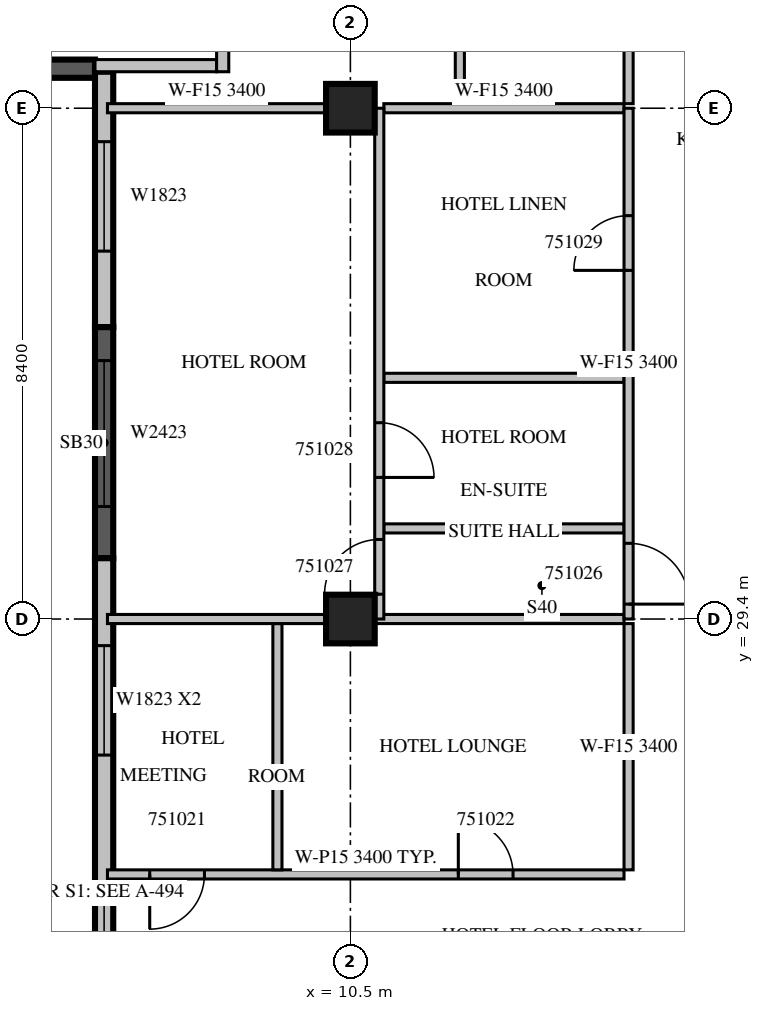
"""IFC4 building model, lengths in metres.
Left out: names, types, materials, properties, quantities, classifications, styles, units other than length and angle.
Written with IfcOpenShell. Run it as: python <this file> out.ifc"""

import sys

from ifc_helpers import new_model, si_unit, direction, frame, frame_2d, origin, origin_2d, place, context, subcontext, project, spatial, rectangle, extrude, source, transform, mapped, element, fill, save


model = new_model("IFC4")
c1 = context("Model", 3, precision=1e-05, world=origin(), true_north=direction((0.0, 1.0)))
c2 = subcontext(c1, "Body", "Model", "MODEL_VIEW")
j1 = project(units=[si_unit("LENGTHUNIT", "METRE"), si_unit("PLANEANGLEUNIT", "RADIAN")], contexts=[c1])
p1 = place(None, origin())
s1 = spatial("IfcSite", under=j1, at=p1, CompositionType="ELEMENT")
p2 = place(p1, origin())
s2 = spatial("IfcBuilding", under=s1, at=p2, CompositionType="ELEMENT")
p3 = place(p2, frame((0.0, 0.0, 227.2)))
s3 = spatial("IfcBuildingStorey", under=s2, at=p3, CompositionType="ELEMENT", Elevation=227.2)
m1 = source(origin(), c2, "Body", "SweptSolid", [
    extrude(rectangle(XDim=0.8, YDim=0.8, at=origin_2d()), origin(), (0.0, 0.0, 1.0), 3.8),
])
for number, where, z_axis, x_axis in (
    (1, (10.5, 29.4, 0.0), (0.0, 0.0, 1.0), (1.0, 0.0, 0.0)),
    (2, (10.5, 37.8, 0.0), (0.0, 0.0, 1.0), (1.0, 0.0, 0.0)),
):
    element("IfcColumn", number, at=place(p3, frame(where, z_axis=z_axis, x_axis=x_axis)), inside=s3, PredefinedType="COLUMN", context=c2, shape_type="MappedRepresentation", body=[
        mapped(m1, transform((0.0, 0.0, 0.0), scale=1.0)),
    ])
m2 = source(origin(), c2, "Body", "SweptSolid", [
    extrude(rectangle(XDim=6.1, YDim=0.3, at=frame_2d((3.05, 0.0))), origin(), (0.0, 0.0, 1.0), 3.4),
])
p4 = place(p3, frame((0.2, 38.45, 0.0), z_axis=(0.0, 0.0, 1.0), x_axis=(1.0, 0.0, 0.0)))
e3 = element("IfcWall", 3, at=p4, inside=s3, PredefinedType="SOLIDWALL", context=c2, shape_type="MappedRepresentation", body=[
    mapped(m2, transform((0.0, 0.0, 0.0), scale=1.0)),
])
m3 = source(origin(), c2, "Body", "SweptSolid", [
    extrude(rectangle(XDim=4.2, YDim=0.3, at=frame_2d((2.1, 0.0))), origin(), (0.0, 0.0, 1.0), 3.4),
])
p5 = place(p3, frame((6.45, 38.4, 0.0), z_axis=(0.0, 0.0, 1.0), x_axis=(0.0, -1.0, 0.0)))
e4 = element("IfcWall", 4, at=p5, inside=s3, PredefinedType="STANDARD", context=c2, shape_type="MappedRepresentation", body=[
    mapped(m3, transform((0.0, 0.0, 0.0), scale=1.0)),
])
m4 = source(origin(), c2, "Body", "SweptSolid", [
    extrude(rectangle(XDim=1.8, YDim=2.3, at=frame_2d((0.9, 1.15))), frame((0.0, 0.16, 0.0), z_axis=(0.0, -1.0, 0.0), x_axis=(1.0, 0.0, 0.0)), (0.0, 0.0, 1.0), 0.32),
])
p6 = place(p5, frame((1.15, 0.0, 0.6)))
e5 = element("IfcOpeningElement", 5, at=p6, cuts=e4, PredefinedType="OPENING", context=c2, shape_type="MappedRepresentation", body=[
    mapped(m4, transform((0.0, 0.0, 0.0), scale=1.0)),
])
m5 = source(origin(), c2, "Body", "SweptSolid", [
    extrude(rectangle(XDim=3.8, YDim=0.3, at=frame_2d((1.9, 0.0))), origin(), (0.0, 0.0, 1.0), 3.4),
])
p7 = place(p3, frame((6.45, 34.2, 0.0), z_axis=(0.0, 0.0, 1.0), x_axis=(0.0, -1.0, 0.0)))
e6 = element("IfcWall", 6, at=p7, inside=s3, PredefinedType="SOLIDWALL", context=c2, shape_type="MappedRepresentation", body=[
    mapped(m5, transform((0.0, 0.0, 0.0), scale=1.0)),
])
m6 = source(origin(), c2, "Body", "SweptSolid", [
    extrude(rectangle(XDim=2.4, YDim=2.3, at=frame_2d((1.2, 1.15))), frame((0.0, 0.16, 0.0), z_axis=(0.0, -1.0, 0.0), x_axis=(1.0, 0.0, 0.0)), (0.0, 0.0, 1.0), 0.32),
])
p8 = place(p7, frame((0.55, 0.0, 0.6)))
e7 = element("IfcOpeningElement", 7, at=p8, cuts=e6, PredefinedType="OPENING", context=c2, shape_type="MappedRepresentation", body=[
    mapped(m6, transform((0.0, 0.0, 0.0), scale=1.0)),
])
m7 = source(origin(), c2, "Body", "SweptSolid", [
    extrude(rectangle(XDim=8.6, YDim=0.3, at=frame_2d((4.3, 0.0))), origin(), (0.0, 0.0, 1.0), 3.4),
])
p9 = place(p3, frame((6.45, 30.4, 0.0), z_axis=(0.0, 0.0, 1.0), x_axis=(0.0, -1.0, 0.0)))
e8 = element("IfcWall", 8, at=p9, inside=s3, PredefinedType="STANDARD", context=c2, shape_type="MappedRepresentation", body=[
    mapped(m7, transform((0.0, 0.0, 0.0), scale=1.0)),
])
p10 = place(p9, frame((1.438, 0.0, 0.6)))
e9 = element("IfcOpeningElement", 9, at=p10, cuts=e8, PredefinedType="OPENING", context=c2, shape_type="MappedRepresentation", body=[
    mapped(m4, transform((0.0, 0.0, 0.0), scale=1.0)),
])
p11 = place(p9, frame((5.638, 0.0, 0.6)))
e10 = element("IfcOpeningElement", 10, at=p11, cuts=e8, PredefinedType="OPENING", context=c2, shape_type="MappedRepresentation", body=[
    mapped(m4, transform((0.0, 0.0, 0.0), scale=1.0)),
])
m8 = source(origin(), c2, "Body", "SweptSolid", [
    extrude(rectangle(XDim=2.0, YDim=0.2, at=frame_2d((1.0, 0.0))), origin(), (0.0, 0.0, 1.0), 3.4),
])
p12 = place(p3, frame((6.3, 38.5, 0.0), z_axis=(0.0, 0.0, 1.0), x_axis=(1.0, 0.0, 0.0)))
e11 = element("IfcWall", 11, at=p12, inside=s3, PredefinedType="PARTITIONING", context=c2, shape_type="MappedRepresentation", body=[
    mapped(m8, transform((0.0, 0.0, 0.0), scale=1.0)),
])
m9 = source(origin(), c2, "Body", "SweptSolid", [
    extrude(rectangle(XDim=5.45, YDim=0.2, at=frame_2d((2.725, 0.0))), origin(), (0.0, 0.0, 1.0), 3.4),
])
p13 = place(p3, frame((8.4, 38.4, 0.0), z_axis=(0.0, 0.0, 1.0), x_axis=(0.0, 1.0, 0.0)))
e12 = element("IfcWall", 12, at=p13, inside=s3, PredefinedType="PARTITIONING", context=c2, shape_type="MappedRepresentation", body=[
    mapped(m9, transform((0.0, 0.0, 0.0), scale=1.0)),
])
m10 = source(origin(), c2, "Body", "SweptSolid", [
    extrude(rectangle(XDim=1.2, YDim=2.1, at=frame_2d((0.6, 1.05))), frame((0.0, 0.11, 0.0), z_axis=(0.0, -1.0, 0.0), x_axis=(1.0, 0.0, 0.0)), (0.0, 0.0, 1.0), 0.22),
])
p14 = place(p13, frame((0.4, 0.0, 0.0)))
e13 = element("IfcOpeningElement", 13, at=p14, cuts=e12, PredefinedType="OPENING", context=c2, shape_type="MappedRepresentation", body=[
    mapped(m10, transform((0.0, 0.0, 0.0), scale=1.0)),
])
m11 = source(origin(), c2, "Body", "SweptSolid", [
    extrude(rectangle(XDim=0.9, YDim=2.1, at=frame_2d((0.45, 1.05))), frame((0.0, 0.11, 0.0), z_axis=(0.0, -1.0, 0.0), x_axis=(1.0, 0.0, 0.0)), (0.0, 0.0, 1.0), 0.22),
])
p15 = place(p13, frame((3.25, 0.0, 0.0)))
e14 = element("IfcOpeningElement", 14, at=p15, cuts=e12, PredefinedType="OPENING", context=c2, shape_type="MappedRepresentation", body=[
    mapped(m11, transform((0.0, 0.0, 0.0), scale=1.0)),
])
m12 = source(origin(), c2, "Body", "SweptSolid", [
    extrude(rectangle(XDim=8.495, YDim=0.15, at=frame_2d((4.247, 0.0))), origin(), (0.0, 0.0, 1.0), 3.4),
])
p16 = place(p3, frame((6.505, 25.2, 0.0), z_axis=(0.0, 0.0, 1.0), x_axis=(1.0, 0.0, 0.0)))
e15 = element("IfcWall", 15, at=p16, inside=s3, PredefinedType="PARTITIONING", context=c2, shape_type="MappedRepresentation", body=[
    mapped(m12, transform((0.0, 0.0, 0.0), scale=1.0)),
])
m13 = source(origin(), c2, "Body", "SweptSolid", [
    extrude(rectangle(XDim=0.9, YDim=2.1, at=frame_2d((0.45, 1.05))), frame((0.0, 0.085, 0.0), z_axis=(0.0, -1.0, 0.0), x_axis=(1.0, 0.0, 0.0)), (0.0, 0.0, 1.0), 0.17),
])
p17 = place(p16, frame((0.695, 0.0, 0.0)))
e16 = element("IfcOpeningElement", 16, at=p17, cuts=e15, PredefinedType="OPENING", context=c2, shape_type="MappedRepresentation", body=[
    mapped(m13, transform((0.0, 0.0, 0.0), scale=1.0)),
])
p18 = place(p16, frame((5.77, 0.0, 0.0)))
e17 = element("IfcOpeningElement", 17, at=p18, cuts=e15, PredefinedType="OPENING", context=c2, shape_type="MappedRepresentation", body=[
    mapped(m13, transform((0.0, 0.0, 0.0), scale=1.0)),
])
m14 = source(origin(), c2, "Body", "SweptSolid", [
    extrude(rectangle(XDim=4.05, YDim=0.15, at=frame_2d((2.025, 0.0))), origin(), (0.0, 0.0, 1.0), 3.4),
])
for number, where, z_axis, x_axis in (
    (18, (9.3, 25.275, 0.0), (0.0, 0.0, 1.0), (0.0, 1.0, 0.0)),
    (19, (15.075, 25.275, 0.0), (0.0, 0.0, 1.0), (0.0, 1.0, 0.0)),
):
    element("IfcWall", number, at=place(p3, frame(where, z_axis=z_axis, x_axis=x_axis)), inside=s3, PredefinedType="PARTITIONING", context=c2, shape_type="MappedRepresentation", body=[
        mapped(m14, transform((0.0, 0.0, 0.0), scale=1.0)),
    ])
p19 = place(p3, frame((10.101, 29.4, 0.0), z_axis=(0.0, 0.0, 1.0), x_axis=(-1.0, 0.0, 0.0)))
e20 = element("IfcWall", 20, at=p19, inside=s3, PredefinedType="PARTITIONING", context=c2, shape_type="SweptSolid", body=[
    extrude(rectangle(XDim=3.596, YDim=0.15, at=frame_2d((1.798, 0.0))), origin(), (0.0, 0.0, 1.0), 3.4),
])
m15 = source(origin(), c2, "Body", "SweptSolid", [
    extrude(rectangle(XDim=4.101, YDim=0.15, at=frame_2d((2.05, 0.0))), origin(), (0.0, 0.0, 1.0), 3.4),
])
p20 = place(p3, frame((15.0, 29.4, 0.0), z_axis=(0.0, 0.0, 1.0), x_axis=(-1.0, 0.0, 0.0)))
e21 = element("IfcWall", 21, at=p20, inside=s3, PredefinedType="PARTITIONING", context=c2, shape_type="MappedRepresentation", body=[
    mapped(m15, transform((0.0, 0.0, 0.0), scale=1.0)),
])
m16 = source(origin(), c2, "Body", "SweptSolid", [
    extrude(rectangle(XDim=6.45, YDim=0.15, at=frame_2d((3.225, 0.0))), origin(), (0.0, 0.0, 1.0), 3.4),
])
p21 = place(p3, frame((12.3, 44.325, 0.0), z_axis=(0.0, 0.0, 1.0), x_axis=(0.0, -1.0, 0.0)))
e22 = element("IfcWall", 22, at=p21, inside=s3, PredefinedType="PARTITIONING", context=c2, shape_type="MappedRepresentation", body=[
    mapped(m16, transform((0.0, 0.0, 0.0), scale=1.0)),
])
p22 = place(p3, frame((15.075, 37.875, 0.0), z_axis=(0.0, 0.0, 1.0), x_axis=(0.0, 1.0, 0.0)))
e23 = element("IfcWall", 23, at=p22, inside=s3, PredefinedType="PARTITIONING", context=c2, shape_type="MappedRepresentation", body=[
    mapped(m16, transform((0.0, 0.0, 0.0), scale=1.0)),
])
p23 = place(p22, frame((2.737, 0.0, 0.0)))
e24 = element("IfcOpeningElement", 24, at=p23, cuts=e23, PredefinedType="OPENING", context=c2, shape_type="MappedRepresentation", body=[
    mapped(m13, transform((0.0, 0.0, 0.0), scale=1.0)),
])
m17 = source(origin(), c2, "Body", "SweptSolid", [
    extrude(rectangle(XDim=3.95, YDim=0.15, at=frame_2d((1.975, 0.0))), origin(), (0.0, 0.0, 1.0), 3.4),
])
for number, where, z_axis, x_axis in (
    (25, (15.0, 30.89, 0.0), (0.0, 0.0, 1.0), (-1.0, 0.0, 0.0)),
    (26, (15.0, 33.367, 0.0), (0.0, 0.0, 1.0), (-1.0, 0.0, 0.0)),
):
    element("IfcWall", number, at=place(p3, frame(where, z_axis=z_axis, x_axis=x_axis)), inside=s3, PredefinedType="PARTITIONING", context=c2, shape_type="MappedRepresentation", body=[
        mapped(m17, transform((0.0, 0.0, 0.0), scale=1.0)),
    ])
m18 = source(origin(), c2, "Body", "SweptSolid", [
    extrude(rectangle(XDim=3.596, YDim=0.15, at=frame_2d((1.798, 0.0))), origin(), (0.0, 0.0, 1.0), 3.4),
])
p24 = place(p3, frame((10.101, 37.8, 0.0), z_axis=(0.0, 0.0, 1.0), x_axis=(-1.0, 0.0, 0.0)))
e27 = element("IfcWall", 27, at=p24, inside=s3, PredefinedType="PARTITIONING", context=c2, shape_type="MappedRepresentation", body=[
    mapped(m18, transform((0.0, 0.0, 0.0), scale=1.0)),
])
p25 = place(p3, frame((15.0, 37.8, 0.0), z_axis=(0.0, 0.0, 1.0), x_axis=(-1.0, 0.0, 0.0)))
e28 = element("IfcWall", 28, at=p25, inside=s3, PredefinedType="PARTITIONING", context=c2, shape_type="MappedRepresentation", body=[
    mapped(m17, transform((0.0, 0.0, 0.0), scale=1.0)),
])
m19 = source(origin(), c2, "Body", "SweptSolid", [
    extrude(rectangle(XDim=8.4, YDim=0.15, at=frame_2d((4.2, 0.0))), origin(), (0.0, 0.0, 1.0), 3.4),
])
p26 = place(p3, frame((10.975, 29.4, 0.0), z_axis=(0.0, 0.0, 1.0), x_axis=(0.0, 1.0, 0.0)))
e29 = element("IfcWall", 29, at=p26, inside=s3, PredefinedType="PARTITIONING", context=c2, shape_type="MappedRepresentation", body=[
    mapped(m19, transform((0.0, 0.0, 0.0), scale=1.0)),
])
p27 = place(p26, frame((0.408, 0.0, 0.0)))
e30 = element("IfcOpeningElement", 30, at=p27, cuts=e29, PredefinedType="OPENING", context=c2, shape_type="MappedRepresentation", body=[
    mapped(m13, transform((0.0, 0.0, 0.0), scale=1.0)),
])
p28 = place(p26, frame((2.328, 0.0, 0.0)))
e31 = element("IfcOpeningElement", 31, at=p28, cuts=e29, PredefinedType="OPENING", context=c2, shape_type="MappedRepresentation", body=[
    mapped(m13, transform((0.0, 0.0, 0.0), scale=1.0)),
])
p29 = place(p3, frame((15.075, 29.4, 0.0), z_axis=(0.0, 0.0, 1.0), x_axis=(0.0, 1.0, 0.0)))
e32 = element("IfcWall", 32, at=p29, inside=s3, PredefinedType="PARTITIONING", context=c2, shape_type="MappedRepresentation", body=[
    mapped(m19, transform((0.0, 0.0, 0.0), scale=1.0)),
])
m20 = source(origin(), c2, "Body", "SweptSolid", [
    extrude(rectangle(XDim=1.0, YDim=2.1, at=frame_2d((0.5, 1.05))), frame((0.0, 0.085, 0.0), z_axis=(0.0, -1.0, 0.0), x_axis=(1.0, 0.0, 0.0)), (0.0, 0.0, 1.0), 0.17),
])
p30 = place(p29, frame((0.245, 0.0, 0.0)))
e33 = element("IfcOpeningElement", 33, at=p30, cuts=e32, PredefinedType="OPENING", context=c2, shape_type="MappedRepresentation", body=[
    mapped(m20, transform((0.0, 0.0, 0.0), scale=1.0)),
])
p31 = place(p29, frame((5.733, 0.0, 0.0)))
e34 = element("IfcOpeningElement", 34, at=p31, cuts=e32, PredefinedType="OPENING", context=c2, shape_type="MappedRepresentation", body=[
    mapped(m13, transform((0.0, 0.0, 0.0), scale=1.0)),
])
m21 = source(origin(), c2, "Body", "SweptSolid", [
    extrude(rectangle(XDim=1.8, YDim=2.3, at=frame_2d((0.9, 1.15))), frame((0.0, 0.03, 0.0), z_axis=(0.0, -1.0, 0.0), x_axis=(1.0, 0.0, 0.0)), (0.0, 0.0, 1.0), 0.06),
])
p32 = place(p6, origin())
e35 = element("IfcWindow", 35, at=p32, inside=s3, PartitioningType="SINGLE_PANEL", PredefinedType="WINDOW", context=c2, shape_type="MappedRepresentation", body=[
    mapped(m21, transform((0.0, 0.0, 0.0), scale=1.0)),
])
fill(e5, e35)
m22 = source(origin(), c2, "Body", "SweptSolid", [
    extrude(rectangle(XDim=2.4, YDim=2.3, at=frame_2d((1.2, 1.15))), frame((0.0, 0.03, 0.0), z_axis=(0.0, -1.0, 0.0), x_axis=(1.0, 0.0, 0.0)), (0.0, 0.0, 1.0), 0.06),
])
p33 = place(p8, origin())
e36 = element("IfcWindow", 36, at=p33, inside=s3, PartitioningType="SINGLE_PANEL", PredefinedType="WINDOW", context=c2, shape_type="MappedRepresentation", body=[
    mapped(m22, transform((0.0, 0.0, 0.0), scale=1.0)),
])
fill(e7, e36)
p34 = place(p10, origin())
e37 = element("IfcWindow", 37, at=p34, inside=s3, PartitioningType="SINGLE_PANEL", PredefinedType="WINDOW", context=c2, shape_type="MappedRepresentation", body=[
    mapped(m21, transform((0.0, 0.0, 0.0), scale=1.0)),
])
fill(e9, e37)
p35 = place(p11, origin())
e38 = element("IfcWindow", 38, at=p35, inside=s3, PartitioningType="SINGLE_PANEL", PredefinedType="WINDOW", context=c2, shape_type="MappedRepresentation", body=[
    mapped(m21, transform((0.0, 0.0, 0.0), scale=1.0)),
])
fill(e10, e38)
m23 = source(origin(), c2, "Body", "SweptSolid", [
    extrude(rectangle(XDim=0.9, YDim=2.1, at=frame_2d((0.45, 1.05))), frame((0.0, 0.025, 0.0), z_axis=(0.0, -1.0, 0.0), x_axis=(1.0, 0.0, 0.0)), (0.0, 0.0, 1.0), 0.05),
])
p36 = place(p17, origin())
e39 = element("IfcDoor", 39, at=p36, inside=s3, OperationType="SINGLE_SWING_RIGHT", PredefinedType="DOOR", context=c2, shape_type="MappedRepresentation", body=[
    mapped(m23, transform((0.0, 0.0, 0.0), scale=1.0)),
])
fill(e16, e39)
p37 = place(p18, origin())
e40 = element("IfcDoor", 40, at=p37, inside=s3, OperationType="SINGLE_SWING_LEFT", PredefinedType="DOOR", context=c2, shape_type="MappedRepresentation", body=[
    mapped(m23, transform((0.0, 0.0, 0.0), scale=1.0)),
])
fill(e17, e40)
m24 = source(origin(), c2, "Body", "SweptSolid", [
    extrude(rectangle(XDim=1.0, YDim=2.1, at=frame_2d((0.5, 1.05))), frame((0.0, 0.025, 0.0), z_axis=(0.0, -1.0, 0.0), x_axis=(1.0, 0.0, 0.0)), (0.0, 0.0, 1.0), 0.05),
])
p38 = place(p30, origin())
e41 = element("IfcDoor", 41, at=p38, inside=s3, OperationType="SINGLE_SWING_RIGHT", PredefinedType="DOOR", context=c2, shape_type="MappedRepresentation", body=[
    mapped(m24, transform((0.0, 0.0, 0.0), scale=1.0)),
])
fill(e33, e41)
p39 = place(p27, origin())
e42 = element("IfcDoor", 42, at=p39, inside=s3, OperationType="SINGLE_SWING_LEFT", PredefinedType="DOOR", context=c2, shape_type="MappedRepresentation", body=[
    mapped(m23, transform((0.0, 0.0, 0.0), scale=1.0)),
])
fill(e30, e42)
p40 = place(p28, origin())
e43 = element("IfcDoor", 43, at=p40, inside=s3, OperationType="SINGLE_SWING_RIGHT", PredefinedType="DOOR", context=c2, shape_type="MappedRepresentation", body=[
    mapped(m23, transform((0.0, 0.0, 0.0), scale=1.0)),
])
fill(e31, e43)
p41 = place(p31, origin())
e44 = element("IfcDoor", 44, at=p41, inside=s3, OperationType="SINGLE_SWING_LEFT", PredefinedType="DOOR", context=c2, shape_type="MappedRepresentation", body=[
    mapped(m23, transform((0.0, 0.0, 0.0), scale=1.0)),
])
fill(e34, e44)
save(model, sys.argv[1])
